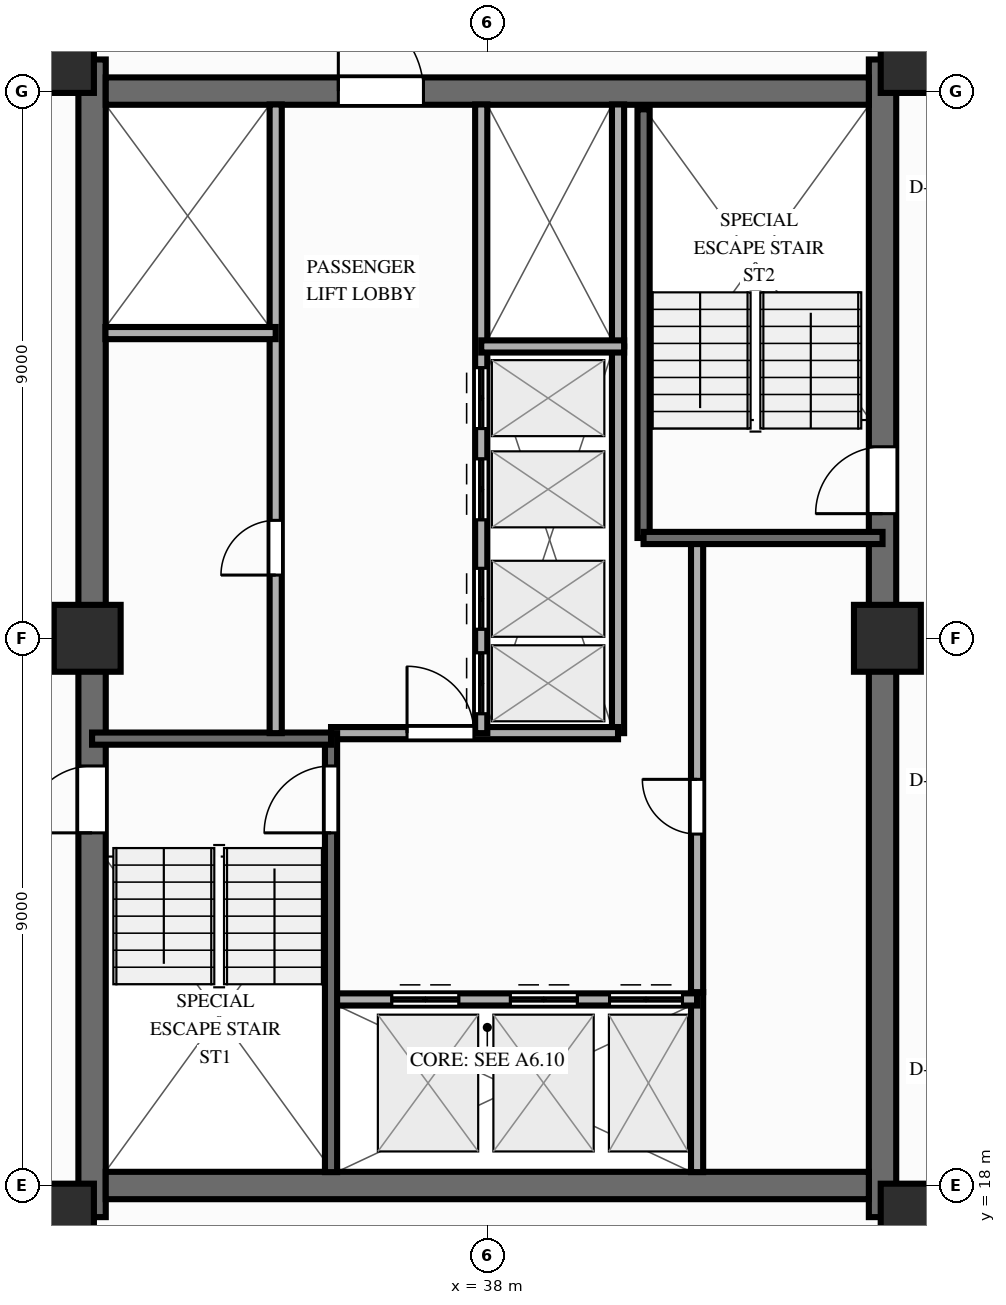
"""IFC4 building model, lengths in metres.
Left out: names, types, materials, properties, quantities, classifications, styles, units other than length and angle.
Written with IfcOpenShell. Run it as: python <this file> out.ifc"""

import sys

from ifc_helpers import new_model, si_unit, direction, frame, frame_2d, origin, origin_2d, place, context, subcontext, project, spatial, rectangle, extrude, source, transform, mapped, element, fill, save


model = new_model("IFC4")
c1 = context("Model", 3, precision=1e-05, world=origin(), true_north=direction((0.0, 1.0)))
c2 = subcontext(c1, "Body", "Model", "MODEL_VIEW")
j1 = project(units=[si_unit("LENGTHUNIT", "METRE"), si_unit("PLANEANGLEUNIT", "RADIAN")], contexts=[c1])
p1 = place(None, origin())
s1 = spatial("IfcSite", under=j1, at=p1, CompositionType="ELEMENT")
p2 = place(p1, origin())
s2 = spatial("IfcBuilding", under=s1, at=p2, CompositionType="ELEMENT")
p3 = place(p2, frame((0.0, 0.0, 163.0)))
s3 = spatial("IfcBuildingStorey", under=s2, at=p3, CompositionType="ELEMENT", Elevation=163.0)
p4 = place(p3, frame((31.5, 17.48, 0.0), z_axis=(0.0, 0.0, 1.0), x_axis=(0.0, 1.0, 0.0)))
e1 = element("IfcWall", 1, at=p4, inside=s3, PredefinedType="SHEAR", context=c2, shape_type="SweptSolid", body=[
    extrude(rectangle(XDim=19.04, YDim=0.45, at=frame_2d((9.52, 0.0))), origin(), (0.0, 0.0, 1.0), 3.0),
])
p5 = place(p4, frame((6.32, 0.0, 0.0)))
e2 = element("IfcOpeningElement", 2, at=p5, cuts=e1, PredefinedType="OPENING", context=c2, shape_type="SweptSolid", body=[
    extrude(rectangle(XDim=1.1, YDim=2.15, at=frame_2d((0.55, 1.075))), frame((0.0, 0.237, 0.0), z_axis=(0.0, -1.0, 0.0), x_axis=(1.0, 0.0, 0.0)), (0.0, 0.0, 1.0), 0.474),
])
p6 = place(p3, frame((44.5, 17.48, 0.0), z_axis=(0.0, 0.0, 1.0), x_axis=(0.0, 1.0, 0.0)))
e3 = element("IfcWall", 3, at=p6, inside=s3, PredefinedType="SHEAR", context=c2, shape_type="SweptSolid", body=[
    extrude(rectangle(XDim=19.04, YDim=0.45, at=frame_2d((9.52, 0.0))), origin(), (0.0, 0.0, 1.0), 3.0),
])
p7 = place(p6, frame((12.67, 0.0, 0.0), z_axis=(0.0, 0.0, 1.0), x_axis=(-1.0, 0.0, 0.0)))
e4 = element("IfcOpeningElement", 4, at=p7, cuts=e3, PredefinedType="OPENING", context=c2, shape_type="SweptSolid", body=[
    extrude(rectangle(XDim=1.1, YDim=2.15, at=frame_2d((0.55, 1.075))), frame((0.0, 0.237, 0.0), z_axis=(0.0, -1.0, 0.0), x_axis=(1.0, 0.0, 0.0)), (0.0, 0.0, 1.0), 0.474),
])
p8 = place(p3, frame((31.725, 18.0, 0.0), z_axis=(0.0, 0.0, 1.0), x_axis=(1.0, 0.0, 0.0)))
e5 = element("IfcWall", 5, at=p8, inside=s3, PredefinedType="SHEAR", context=c2, shape_type="SweptSolid", body=[
    extrude(rectangle(XDim=12.55, YDim=0.45, at=frame_2d((6.275, 0.0))), origin(), (0.0, 0.0, 1.0), 3.0),
])
p9 = place(p3, frame((31.725, 36.0, 0.0), z_axis=(0.0, 0.0, 1.0), x_axis=(1.0, 0.0, 0.0)))
e6 = element("IfcWall", 6, at=p9, inside=s3, PredefinedType="SHEAR", context=c2, shape_type="SweptSolid", body=[
    extrude(rectangle(XDim=12.55, YDim=0.45, at=frame_2d((6.275, 0.0))), origin(), (0.0, 0.0, 1.0), 3.0),
])
p10 = place(p9, frame((5.225, 0.0, 0.0), z_axis=(0.0, 0.0, 1.0), x_axis=(-1.0, 0.0, 0.0)))
e7 = element("IfcOpeningElement", 7, at=p10, cuts=e6, PredefinedType="OPENING", context=c2, shape_type="SweptSolid", body=[
    extrude(rectangle(XDim=1.4, YDim=2.15, at=frame_2d((0.7, 1.075))), frame((0.0, 0.237, 0.0), z_axis=(0.0, -1.0, 0.0), x_axis=(1.0, 0.0, 0.0)), (0.0, 0.0, 1.0), 0.474),
])
m1 = source(origin(), c2, "Body", "SweptSolid", [
    extrude(rectangle(XDim=1.1, YDim=1.1, at=origin_2d()), origin(), (0.0, 0.0, 1.0), 3.0),
])
for number, where, z_axis, x_axis in (
    (8, (30.98, 17.48, 0.0), (0.0, 0.0, 1.0), (1.0, 0.0, 0.0)),
    (9, (45.02, 17.48, 0.0), (0.0, 0.0, 1.0), (1.0, 0.0, 0.0)),
    (10, (30.98, 36.52, 0.0), (0.0, 0.0, 1.0), (1.0, 0.0, 0.0)),
    (11, (45.02, 36.52, 0.0), (0.0, 0.0, 1.0), (1.0, 0.0, 0.0)),
    (12, (31.42, 27.0, 0.0), (0.0, 0.0, 1.0), (1.0, 0.0, 0.0)),
    (13, (44.58, 27.0, 0.0), (0.0, 0.0, 1.0), (1.0, 0.0, 0.0)),
):
    element("IfcColumn", number, at=place(p3, frame(where, z_axis=z_axis, x_axis=x_axis)), inside=s3, PredefinedType="COLUMN", context=c2, shape_type="MappedRepresentation", body=[
        mapped(m1, transform((0.0, 0.0, 0.0), scale=1.0)),
    ])
p11 = place(p3, frame((41.45, 18.22, 0.0), z_axis=(0.0, 0.0, 1.0), x_axis=(0.0, 1.0, 0.0)))
e14 = element("IfcWall", 14, at=p11, inside=s3, PredefinedType="PARTITIONING", context=c2, shape_type="SweptSolid", body=[
    extrude(rectangle(XDim=2.96, YDim=0.2, at=frame_2d((1.48, 0.0))), origin(), (0.0, 0.0, 1.0), 2.79),
])
p12 = place(p3, frame((41.45, 21.18, 0.0), z_axis=(0.0, 0.0, 1.0), x_axis=(0.0, 1.0, 0.0)))
e15 = element("IfcWall", 15, at=p12, inside=s3, PredefinedType="PARTITIONING", context=c2, shape_type="SweptSolid", body=[
    extrude(rectangle(XDim=7.42, YDim=0.2, at=frame_2d((3.71, 0.0))), origin(), (0.0, 0.0, 1.0), 2.79),
])
p13 = place(p12, frame((2.6, 0.0, 0.0)))
e16 = element("IfcOpeningElement", 16, at=p13, cuts=e15, PredefinedType="OPENING", context=c2, shape_type="SweptSolid", body=[
    extrude(rectangle(XDim=0.9, YDim=2.1, at=frame_2d((0.45, 1.05))), frame((0.0, 0.112, 0.0), z_axis=(0.0, -1.0, 0.0), x_axis=(1.0, 0.0, 0.0)), (0.0, 0.0, 1.0), 0.224),
])
p14 = place(p3, frame((40.15, 25.44, 0.0), z_axis=(0.0, 0.0, 1.0), x_axis=(0.0, 1.0, 0.0)))
e17 = element("IfcWall", 17, at=p14, inside=s3, PredefinedType="PARTITIONING", context=c2, shape_type="SweptSolid", body=[
    extrude(rectangle(XDim=6.36, YDim=0.2, at=frame_2d((3.18, 0.0))), origin(), (0.0, 0.0, 1.0), 2.79),
])
p15 = place(p3, frame((40.15, 31.8, 0.0), z_axis=(0.0, 0.0, 1.0), x_axis=(0.0, 1.0, 0.0)))
e18 = element("IfcWall", 18, at=p15, inside=s3, PredefinedType="PARTITIONING", context=c2, shape_type="SweptSolid", body=[
    extrude(rectangle(XDim=3.98, YDim=0.2, at=frame_2d((1.99, 0.0))), origin(), (0.0, 0.0, 1.0), 2.79),
])
p16 = place(p3, frame((35.43, 21.06, 0.0), z_axis=(0.0, 0.0, 1.0), x_axis=(1.0, 0.0, 0.0)))
e19 = element("IfcWall", 19, at=p16, inside=s3, PredefinedType="PARTITIONING", context=c2, shape_type="SweptSolid", body=[
    extrude(rectangle(XDim=6.02, YDim=0.2, at=frame_2d((3.01, 0.0))), origin(), (0.0, 0.0, 1.0), 2.79),
])
p17 = place(p16, frame((1.0, 0.0, 0.0)))
e20 = element("IfcOpeningElement", 20, at=p17, cuts=e19, PredefinedType="OPENING", context=c2, shape_type="SweptSolid", body=[
    extrude(rectangle(XDim=1.1, YDim=2.15, at=frame_2d((0.55, 1.075))), frame((0.0, 0.112, 0.0), z_axis=(0.0, -1.0, 0.0), x_axis=(1.0, 0.0, 0.0)), (0.0, 0.0, 1.0), 0.224),
])
p18 = place(p16, frame((2.95, 0.0, 0.0)))
e21 = element("IfcOpeningElement", 21, at=p18, cuts=e19, PredefinedType="OPENING", context=c2, shape_type="SweptSolid", body=[
    extrude(rectangle(XDim=1.1, YDim=2.15, at=frame_2d((0.55, 1.075))), frame((0.0, 0.112, 0.0), z_axis=(0.0, -1.0, 0.0), x_axis=(1.0, 0.0, 0.0)), (0.0, 0.0, 1.0), 0.224),
])
p19 = place(p16, frame((4.58, 0.0, 0.0)))
e22 = element("IfcOpeningElement", 22, at=p19, cuts=e19, PredefinedType="OPENING", context=c2, shape_type="SweptSolid", body=[
    extrude(rectangle(XDim=1.2, YDim=2.15, at=frame_2d((0.6, 1.075))), frame((0.0, 0.112, 0.0), z_axis=(0.0, -1.0, 0.0), x_axis=(1.0, 0.0, 0.0)), (0.0, 0.0, 1.0), 0.224),
])
p20 = place(p3, frame((35.43, 25.44, 0.0), z_axis=(0.0, 0.0, 1.0), x_axis=(1.0, 0.0, 0.0)))
e23 = element("IfcWall", 23, at=p20, inside=s3, PredefinedType="PARTITIONING", context=c2, shape_type="SweptSolid", body=[
    extrude(rectangle(XDim=4.72, YDim=0.2, at=frame_2d((2.36, 0.0))), origin(), (0.0, 0.0, 1.0), 2.79),
])
p21 = place(p20, frame((1.25, 0.0, 0.0)))
e24 = element("IfcOpeningElement", 24, at=p21, cuts=e23, PredefinedType="OPENING", context=c2, shape_type="SweptSolid", body=[
    extrude(rectangle(XDim=1.1, YDim=2.15, at=frame_2d((0.55, 1.075))), frame((0.0, 0.112, 0.0), z_axis=(0.0, -1.0, 0.0), x_axis=(1.0, 0.0, 0.0)), (0.0, 0.0, 1.0), 0.224),
])
p22 = place(p3, frame((35.43, 18.22, 0.0), z_axis=(0.0, 0.0, 1.0), x_axis=(0.0, 1.0, 0.0)))
e25 = element("IfcWall", 25, at=p22, inside=s3, PredefinedType="SOLIDWALL", context=c2, shape_type="SweptSolid", body=[
    extrude(rectangle(XDim=7.22, YDim=0.2, at=frame_2d((3.61, 0.0))), origin(), (0.0, 0.0, 1.0), 2.79),
])
p23 = place(p22, frame((6.68, 0.0, 0.0), z_axis=(0.0, 0.0, 1.0), x_axis=(-1.0, 0.0, 0.0)))
e26 = element("IfcOpeningElement", 26, at=p23, cuts=e25, PredefinedType="OPENING", context=c2, shape_type="SweptSolid", body=[
    extrude(rectangle(XDim=1.1, YDim=2.15, at=frame_2d((0.55, 1.075))), frame((0.0, 0.112, 0.0), z_axis=(0.0, -1.0, 0.0), x_axis=(1.0, 0.0, 0.0)), (0.0, 0.0, 1.0), 0.224),
])
p24 = place(p3, frame((31.5, 25.35, 0.0), z_axis=(0.0, 0.0, 1.0), x_axis=(1.0, 0.0, 0.0)))
e27 = element("IfcWall", 27, at=p24, inside=s3, PredefinedType="SOLIDWALL", context=c2, shape_type="SweptSolid", body=[
    extrude(rectangle(XDim=3.93, YDim=0.2, at=frame_2d((1.965, 0.0))), origin(), (0.0, 0.0, 1.0), 2.79),
])
p25 = place(p3, frame((40.57, 28.65, 0.0), z_axis=(0.0, 0.0, 1.0), x_axis=(0.0, 1.0, 0.0)))
e28 = element("IfcWall", 28, at=p25, inside=s3, PredefinedType="SOLIDWALL", context=c2, shape_type="SweptSolid", body=[
    extrude(rectangle(XDim=7.05, YDim=0.2, at=frame_2d((3.525, 0.0))), origin(), (0.0, 0.0, 1.0), 2.79),
])
p26 = place(p3, frame((40.57, 28.65, 0.0), z_axis=(0.0, 0.0, 1.0), x_axis=(1.0, 0.0, 0.0)))
e29 = element("IfcWall", 29, at=p26, inside=s3, PredefinedType="SOLIDWALL", context=c2, shape_type="SweptSolid", body=[
    extrude(rectangle(XDim=3.93, YDim=0.2, at=frame_2d((1.965, 0.0))), origin(), (0.0, 0.0, 1.0), 2.79),
])
p27 = place(p3, frame((34.52, 25.44, 0.0), z_axis=(0.0, 0.0, 1.0), x_axis=(0.0, 1.0, 0.0)))
e30 = element("IfcWall", 30, at=p27, inside=s3, PredefinedType="PARTITIONING", context=c2, shape_type="SweptSolid", body=[
    extrude(rectangle(XDim=10.34, YDim=0.2, at=frame_2d((5.17, 0.0))), origin(), (0.0, 0.0, 1.0), 2.79),
])
p28 = place(p27, frame((2.6, 0.0, 0.0)))
e31 = element("IfcOpeningElement", 31, at=p28, cuts=e30, PredefinedType="OPENING", context=c2, shape_type="SweptSolid", body=[
    extrude(rectangle(XDim=0.9, YDim=2.1, at=frame_2d((0.45, 1.05))), frame((0.0, 0.112, 0.0), z_axis=(0.0, -1.0, 0.0), x_axis=(1.0, 0.0, 0.0)), (0.0, 0.0, 1.0), 0.224),
])
p29 = place(p3, frame((31.72, 32.02, 0.0), z_axis=(0.0, 0.0, 1.0), x_axis=(1.0, 0.0, 0.0)))
e32 = element("IfcWall", 32, at=p29, inside=s3, PredefinedType="PARTITIONING", context=c2, shape_type="SweptSolid", body=[
    extrude(rectangle(XDim=2.8, YDim=0.2, at=frame_2d((1.4, 0.0))), origin(), (0.0, 0.0, 1.0), 2.79),
])
p30 = place(p3, frame((37.9, 25.44, 0.0), z_axis=(0.0, 0.0, 1.0), x_axis=(0.0, 1.0, 0.0)))
e33 = element("IfcWall", 33, at=p30, inside=s3, PredefinedType="PARTITIONING", context=c2, shape_type="SweptSolid", body=[
    extrude(rectangle(XDim=10.34, YDim=0.2, at=frame_2d((5.17, 0.0))), origin(), (0.0, 0.0, 1.0), 2.79),
])
p31 = place(p30, frame((0.32, 0.0, 0.0)))
e34 = element("IfcOpeningElement", 34, at=p31, cuts=e33, PredefinedType="OPENING", context=c2, shape_type="SweptSolid", body=[
    extrude(rectangle(XDim=1.0, YDim=2.15, at=frame_2d((0.5, 1.075))), frame((0.0, 0.112, 0.0), z_axis=(0.0, -1.0, 0.0), x_axis=(1.0, 0.0, 0.0)), (0.0, 0.0, 1.0), 0.224),
])
p32 = place(p30, frame((1.71, 0.0, 0.0)))
e35 = element("IfcOpeningElement", 35, at=p32, cuts=e33, PredefinedType="OPENING", context=c2, shape_type="SweptSolid", body=[
    extrude(rectangle(XDim=1.0, YDim=2.15, at=frame_2d((0.5, 1.075))), frame((0.0, 0.112, 0.0), z_axis=(0.0, -1.0, 0.0), x_axis=(1.0, 0.0, 0.0)), (0.0, 0.0, 1.0), 0.224),
])
p33 = place(p30, frame((3.51, 0.0, 0.0)))
e36 = element("IfcOpeningElement", 36, at=p33, cuts=e33, PredefinedType="OPENING", context=c2, shape_type="SweptSolid", body=[
    extrude(rectangle(XDim=1.0, YDim=2.15, at=frame_2d((0.5, 1.075))), frame((0.0, 0.112, 0.0), z_axis=(0.0, -1.0, 0.0), x_axis=(1.0, 0.0, 0.0)), (0.0, 0.0, 1.0), 0.224),
])
p34 = place(p30, frame((5.01, 0.0, 0.0)))
e37 = element("IfcOpeningElement", 37, at=p34, cuts=e33, PredefinedType="OPENING", context=c2, shape_type="SweptSolid", body=[
    extrude(rectangle(XDim=1.0, YDim=2.15, at=frame_2d((0.5, 1.075))), frame((0.0, 0.112, 0.0), z_axis=(0.0, -1.0, 0.0), x_axis=(1.0, 0.0, 0.0)), (0.0, 0.0, 1.0), 0.224),
])
p35 = place(p3, frame((37.9, 31.8, 0.0), z_axis=(0.0, 0.0, 1.0), x_axis=(1.0, 0.0, 0.0)))
e38 = element("IfcWall", 38, at=p35, inside=s3, PredefinedType="PARTITIONING", context=c2, shape_type="SweptSolid", body=[
    extrude(rectangle(XDim=2.35, YDim=0.2, at=frame_2d((1.175, 0.0))), origin(), (0.0, 0.0, 1.0), 2.79),
])
m2 = source(origin(), c2, "Body", "SweptSolid", [
    extrude(rectangle(XDim=1.1, YDim=2.15, at=frame_2d((0.55, 1.075))), frame((0.0, 0.025, 0.0), z_axis=(0.0, -1.0, 0.0), x_axis=(1.0, 0.0, 0.0)), (0.0, 0.0, 1.0), 0.05),
])
p36 = place(p5, origin())
e39 = element("IfcDoor", 39, at=p36, inside=s3, OperationType="SINGLE_SWING_LEFT", PredefinedType="DOOR", context=c2, shape_type="MappedRepresentation", body=[
    mapped(m2, transform((0.0, 0.0, 0.0), scale=1.0)),
])
fill(e2, e39)
p37 = place(p7, origin())
e40 = element("IfcDoor", 40, at=p37, inside=s3, OperationType="SINGLE_SWING_RIGHT", PredefinedType="DOOR", context=c2, shape_type="MappedRepresentation", body=[
    mapped(m2, transform((0.0, 0.0, 0.0), scale=1.0)),
])
fill(e4, e40)
m3 = source(origin(), c2, "Body", "SweptSolid", [
    extrude(rectangle(XDim=1.4, YDim=2.15, at=frame_2d((0.7, 1.075))), frame((0.0, 0.025, 0.0), z_axis=(0.0, -1.0, 0.0), x_axis=(1.0, 0.0, 0.0)), (0.0, 0.0, 1.0), 0.05),
])
p38 = place(p10, origin())
e41 = element("IfcDoor", 41, at=p38, inside=s3, OperationType="SINGLE_SWING_RIGHT", PredefinedType="DOOR", context=c2, shape_type="MappedRepresentation", body=[
    mapped(m3, transform((0.0, 0.0, 0.0), scale=1.0)),
])
fill(e7, e41)
m4 = source(origin(), c2, "Body", "SweptSolid", [
    extrude(rectangle(XDim=0.9, YDim=2.1, at=frame_2d((0.45, 1.05))), frame((0.0, 0.025, 0.0), z_axis=(0.0, -1.0, 0.0), x_axis=(1.0, 0.0, 0.0)), (0.0, 0.0, 1.0), 0.05),
])
p39 = place(p13, origin())
e42 = element("IfcDoor", 42, at=p39, inside=s3, OperationType="SINGLE_SWING_RIGHT", PredefinedType="DOOR", context=c2, shape_type="MappedRepresentation", body=[
    mapped(m4, transform((0.0, 0.0, 0.0), scale=1.0)),
])
fill(e16, e42)
p40 = place(p17, origin())
e43 = element("IfcDoor", 43, at=p40, inside=s3, OperationType="DOUBLE_DOOR_SLIDING", PredefinedType="DOOR", context=c2, shape_type="MappedRepresentation", body=[
    mapped(m2, transform((0.0, 0.0, 0.0), scale=1.0)),
])
fill(e20, e43)
p41 = place(p18, origin())
e44 = element("IfcDoor", 44, at=p41, inside=s3, OperationType="DOUBLE_DOOR_SLIDING", PredefinedType="DOOR", context=c2, shape_type="MappedRepresentation", body=[
    mapped(m2, transform((0.0, 0.0, 0.0), scale=1.0)),
])
fill(e21, e44)
m5 = source(origin(), c2, "Body", "SweptSolid", [
    extrude(rectangle(XDim=1.2, YDim=2.15, at=frame_2d((0.6, 1.075))), frame((0.0, 0.025, 0.0), z_axis=(0.0, -1.0, 0.0), x_axis=(1.0, 0.0, 0.0)), (0.0, 0.0, 1.0), 0.05),
])
p42 = place(p19, origin())
e45 = element("IfcDoor", 45, at=p42, inside=s3, OperationType="DOUBLE_DOOR_SLIDING", PredefinedType="DOOR", context=c2, shape_type="MappedRepresentation", body=[
    mapped(m5, transform((0.0, 0.0, 0.0), scale=1.0)),
])
fill(e22, e45)
p43 = place(p21, origin())
e46 = element("IfcDoor", 46, at=p43, inside=s3, OperationType="SINGLE_SWING_LEFT", PredefinedType="DOOR", context=c2, shape_type="MappedRepresentation", body=[
    mapped(m2, transform((0.0, 0.0, 0.0), scale=1.0)),
])
fill(e24, e46)
p44 = place(p23, origin())
e47 = element("IfcDoor", 47, at=p44, inside=s3, OperationType="SINGLE_SWING_RIGHT", PredefinedType="DOOR", context=c2, shape_type="MappedRepresentation", body=[
    mapped(m2, transform((0.0, 0.0, 0.0), scale=1.0)),
])
fill(e26, e47)
p45 = place(p28, origin())
e48 = element("IfcDoor", 48, at=p45, inside=s3, OperationType="SINGLE_SWING_LEFT", PredefinedType="DOOR", context=c2, shape_type="MappedRepresentation", body=[
    mapped(m4, transform((0.0, 0.0, 0.0), scale=1.0)),
])
fill(e31, e48)
m6 = source(origin(), c2, "Body", "SweptSolid", [
    extrude(rectangle(XDim=1.0, YDim=2.15, at=frame_2d((0.5, 1.075))), frame((0.0, 0.025, 0.0), z_axis=(0.0, -1.0, 0.0), x_axis=(1.0, 0.0, 0.0)), (0.0, 0.0, 1.0), 0.05),
])
p46 = place(p31, origin())
e49 = element("IfcDoor", 49, at=p46, inside=s3, OperationType="DOUBLE_DOOR_SLIDING", PredefinedType="DOOR", context=c2, shape_type="MappedRepresentation", body=[
    mapped(m6, transform((0.0, 0.0, 0.0), scale=1.0)),
])
fill(e34, e49)
p47 = place(p32, origin())
e50 = element("IfcDoor", 50, at=p47, inside=s3, OperationType="DOUBLE_DOOR_SLIDING", PredefinedType="DOOR", context=c2, shape_type="MappedRepresentation", body=[
    mapped(m6, transform((0.0, 0.0, 0.0), scale=1.0)),
])
fill(e35, e50)
p48 = place(p33, origin())
e51 = element("IfcDoor", 51, at=p48, inside=s3, OperationType="DOUBLE_DOOR_SLIDING", PredefinedType="DOOR", context=c2, shape_type="MappedRepresentation", body=[
    mapped(m6, transform((0.0, 0.0, 0.0), scale=1.0)),
])
fill(e36, e51)
p49 = place(p34, origin())
e52 = element("IfcDoor", 52, at=p49, inside=s3, OperationType="DOUBLE_DOOR_SLIDING", PredefinedType="DOOR", context=c2, shape_type="MappedRepresentation", body=[
    mapped(m6, transform((0.0, 0.0, 0.0), scale=1.0)),
])
fill(e37, e52)
save(model, sys.argv[1])
